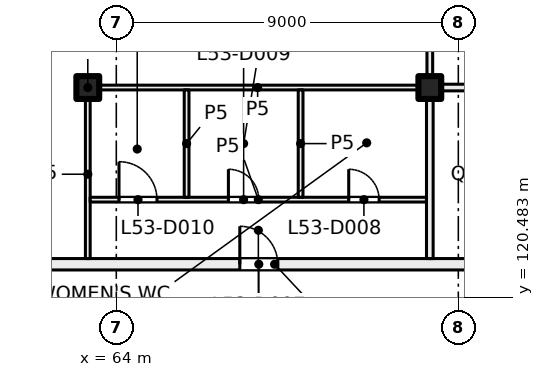
"""IFC4 building model, lengths in metres.
Left out: names, types, materials, properties, quantities, classifications, styles, units other than length and angle.
Written with IfcOpenShell. Run it as: python <this file> out.ifc"""

import sys

from ifc_helpers import new_model, si_unit, direction, frame, frame_2d, origin, origin_2d, place, context, subcontext, project, spatial, rectangle, extrude, element, fill, save


model = new_model("IFC4")
c1 = context("Model", 3, precision=1e-05, world=origin(), true_north=direction((0.0, 1.0)))
c2 = subcontext(c1, "Body", "Model", "MODEL_VIEW")
j1 = project(units=[si_unit("LENGTHUNIT", "METRE"), si_unit("PLANEANGLEUNIT", "RADIAN")], contexts=[c1])
p1 = place(None, origin())
s1 = spatial("IfcSite", under=j1, at=p1, CompositionType="ELEMENT")
p2 = place(p1, origin())
s2 = spatial("IfcBuilding", under=s1, at=p2, CompositionType="ELEMENT")
p3 = place(p2, frame((0.0, 0.0, 224.0)))
s3 = spatial("IfcBuildingStorey", under=s2, at=p3, CompositionType="ELEMENT", Elevation=224.0)
for number, where, z_axis, x_axis in (
    (1, (63.25, 126.0, 0.0), (0.0, 0.0, 1.0), (1.0, 0.0, 0.0)),
    (2, (72.25, 126.0, 0.0), (0.0, 0.0, 1.0), (1.0, 0.0, 0.0)),
):
    element("IfcColumn", number, at=place(p3, frame(where, z_axis=z_axis, x_axis=x_axis)), inside=s3, PredefinedType="COLUMN", context=c2, shape_type="SweptSolid", body=[
        extrude(rectangle(XDim=0.6, YDim=0.6, at=origin_2d()), origin(), (0.0, 0.0, 1.0), 4.0),
    ])
p4 = place(p3, frame((50.506, 121.35, 0.0), z_axis=(0.0, 0.0, 1.0), x_axis=(1.0, 0.0, 0.0)))
e3 = element("IfcWall", 3, at=p4, inside=s3, PredefinedType="PARTITIONING", context=c2, shape_type="SweptSolid", body=[
    extrude(rectangle(XDim=35.319, YDim=0.3, at=frame_2d((17.659, 0.0))), origin(), (0.0, 0.0, 1.0), 3.625),
])
p5 = place(p4, frame((27.244, 0.0, 0.0)))
e4 = element("IfcOpeningElement", 4, at=p5, cuts=e3, PredefinedType="OPENING", context=c2, shape_type="SweptSolid", body=[
    extrude(rectangle(XDim=1.0, YDim=2.1, at=frame_2d((0.5, 1.05))), frame((0.0, 0.16, 0.0), z_axis=(0.0, -1.0, 0.0), x_axis=(1.0, 0.0, 0.0)), (0.0, 0.0, 1.0), 0.32),
])
p6 = place(p4, frame((23.394, 0.0, 0.0)))
e5 = element("IfcOpeningElement", 5, at=p6, cuts=e3, PredefinedType="OPENING", context=c2, shape_type="SweptSolid", body=[
    extrude(rectangle(XDim=1.2, YDim=2.1, at=frame_2d((0.6, 1.05))), frame((0.0, 0.16, 0.0), z_axis=(0.0, -1.0, 0.0), x_axis=(1.0, 0.0, 0.0)), (0.0, 0.0, 1.0), 0.32),
])
p7 = place(p4, frame((32.094, 0.0, 0.0)))
e6 = element("IfcOpeningElement", 6, at=p7, cuts=e3, PredefinedType="OPENING", context=c2, shape_type="SweptSolid", body=[
    extrude(rectangle(XDim=1.8, YDim=2.1, at=frame_2d((0.9, 1.05))), frame((0.0, 0.16, 0.0), z_axis=(0.0, -1.0, 0.0), x_axis=(1.0, 0.0, 0.0)), (0.0, 0.0, 1.0), 0.32),
])
p8 = place(p4, frame((16.744, 0.0, 0.0)))
e7 = element("IfcOpeningElement", 7, at=p8, cuts=e3, PredefinedType="OPENING", context=c2, shape_type="SweptSolid", body=[
    extrude(rectangle(XDim=1.0, YDim=2.1, at=frame_2d((0.5, 1.05))), frame((0.0, 0.16, 0.0), z_axis=(0.0, -1.0, 0.0), x_axis=(1.0, 0.0, 0.0)), (0.0, 0.0, 1.0), 0.32),
])
p9 = place(p4, frame((7.344, 0.0, 0.0)))
e8 = element("IfcOpeningElement", 8, at=p9, cuts=e3, PredefinedType="OPENING", context=c2, shape_type="SweptSolid", body=[
    extrude(rectangle(XDim=1.8, YDim=2.1, at=frame_2d((0.9, 1.05))), frame((0.0, 0.16, 0.0), z_axis=(0.0, -1.0, 0.0), x_axis=(1.0, 0.0, 0.0)), (0.0, 0.0, 1.0), 0.32),
])
p10 = place(p4, frame((1.047, 0.0, 0.0)))
e9 = element("IfcOpeningElement", 9, at=p10, cuts=e3, PredefinedType="OPENING", context=c2, shape_type="SweptSolid", body=[
    extrude(rectangle(XDim=1.8, YDim=2.1, at=frame_2d((0.9, 1.05))), frame((0.0, 0.16, 0.0), z_axis=(0.0, -1.0, 0.0), x_axis=(1.0, 0.0, 0.0)), (0.0, 0.0, 1.0), 0.32),
])
p11 = place(p3, frame((63.25, 121.5, 0.0), z_axis=(0.0, 0.0, 1.0), x_axis=(0.0, 1.0, 0.0)))
e10 = element("IfcWall", 10, at=p11, inside=s3, PredefinedType="PARTITIONING", context=c2, shape_type="SweptSolid", body=[
    extrude(rectangle(XDim=4.438, YDim=0.125, at=frame_2d((2.219, 0.0))), origin(), (0.0, 0.0, 1.0), 3.625),
])
p12 = place(p3, frame((63.312, 123.05, 0.0), z_axis=(0.0, 0.0, 1.0), x_axis=(1.0, 0.0, 0.0)))
e11 = element("IfcWall", 11, at=p12, inside=s3, PredefinedType="PARTITIONING", context=c2, shape_type="SweptSolid", body=[
    extrude(rectangle(XDim=8.85, YDim=0.125, at=frame_2d((4.425, 0.0))), origin(), (0.0, 0.0, 1.0), 3.625),
])
p13 = place(p12, frame((6.804, 0.0, 0.0)))
e12 = element("IfcOpeningElement", 12, at=p13, cuts=e11, PredefinedType="OPENING", context=c2, shape_type="SweptSolid", body=[
    extrude(rectangle(XDim=0.8, YDim=2.1, at=frame_2d((0.4, 1.05))), frame((0.0, 0.073, 0.0), z_axis=(0.0, -1.0, 0.0), x_axis=(1.0, 0.0, 0.0)), (0.0, 0.0, 1.0), 0.145),
])
p14 = place(p12, frame((3.638, 0.0, 0.0)))
e13 = element("IfcOpeningElement", 13, at=p14, cuts=e11, PredefinedType="OPENING", context=c2, shape_type="SweptSolid", body=[
    extrude(rectangle(XDim=0.8, YDim=2.1, at=frame_2d((0.4, 1.05))), frame((0.0, 0.073, 0.0), z_axis=(0.0, -1.0, 0.0), x_axis=(1.0, 0.0, 0.0)), (0.0, 0.0, 1.0), 0.145),
])
p15 = place(p12, frame((0.759, 0.0, 0.0)))
e14 = element("IfcOpeningElement", 14, at=p15, cuts=e11, PredefinedType="OPENING", context=c2, shape_type="SweptSolid", body=[
    extrude(rectangle(XDim=1.0, YDim=2.1, at=frame_2d((0.5, 1.05))), frame((0.0, 0.073, 0.0), z_axis=(0.0, -1.0, 0.0), x_axis=(1.0, 0.0, 0.0)), (0.0, 0.0, 1.0), 0.145),
])
p16 = place(p3, frame((63.188, 126.0, 0.0), z_axis=(0.0, 0.0, 1.0), x_axis=(1.0, 0.0, 0.0)))
e15 = element("IfcWall", 15, at=p16, inside=s3, PredefinedType="PARTITIONING", context=c2, shape_type="SweptSolid", body=[
    extrude(rectangle(XDim=9.062, YDim=0.125, at=frame_2d((4.531, 0.0))), origin(), (0.0, 0.0, 1.0), 3.625),
])
for number, where, z_axis, x_axis in (
    (16, (65.85, 125.938, 0.0), (0.0, 0.0, 1.0), (0.0, -1.0, 0.0)),
    (17, (68.85, 125.938, 0.0), (0.0, 0.0, 1.0), (0.0, -1.0, 0.0)),
):
    element("IfcWall", number, at=place(p3, frame(where, z_axis=z_axis, x_axis=x_axis)), inside=s3, PredefinedType="PARTITIONING", context=c2, shape_type="SweptSolid", body=[
        extrude(rectangle(XDim=2.826, YDim=0.125, at=frame_2d((1.413, 0.0))), origin(), (0.0, 0.0, 1.0), 3.625),
    ])
p17 = place(p3, frame((72.25, 121.5, 0.0), z_axis=(0.0, 0.0, 1.0), x_axis=(0.0, 1.0, 0.0)))
e18 = element("IfcWall", 18, at=p17, inside=s3, PredefinedType="PARTITIONING", context=c2, shape_type="SweptSolid", body=[
    extrude(rectangle(XDim=4.5, YDim=0.175, at=frame_2d((2.25, 0.0))), origin(), (0.0, 0.0, 1.0), 3.625),
])
p18 = place(p3, frame((72.25, 126.0, 0.0), z_axis=(0.0, 0.0, 1.0), x_axis=(0.0, 1.0, 0.0)))
e19 = element("IfcWall", 19, at=p18, inside=s3, PredefinedType="PARTITIONING", context=c2, shape_type="SweptSolid", body=[
    extrude(rectangle(XDim=3.9, YDim=0.15, at=frame_2d((1.95, 0.0))), origin(), (0.0, 0.0, 1.0), 3.625),
])
p19 = place(p3, frame((72.25, 126.0, 0.0), z_axis=(0.0, 0.0, 1.0), x_axis=(1.0, 0.0, 0.0)))
e20 = element("IfcWall", 20, at=p19, inside=s3, PredefinedType="PARTITIONING", context=c2, shape_type="SweptSolid", body=[
    extrude(rectangle(XDim=4.5, YDim=0.175, at=frame_2d((2.25, 0.0))), origin(), (0.0, 0.0, 1.0), 3.625),
])
p20 = place(p8, origin())
e21 = element("IfcDoor", 21, at=p20, inside=s3, OperationType="SINGLE_SWING_LEFT", PredefinedType="DOOR", context=c2, shape_type="SweptSolid", body=[
    extrude(rectangle(XDim=1.0, YDim=2.1, at=frame_2d((0.5, 1.05))), frame((0.0, 0.025, 0.0), z_axis=(0.0, -1.0, 0.0), x_axis=(1.0, 0.0, 0.0)), (0.0, 0.0, 1.0), 0.05),
])
fill(e7, e21)
p21 = place(p13, origin())
e22 = element("IfcDoor", 22, at=p21, inside=s3, OperationType="SINGLE_SWING_RIGHT", PredefinedType="DOOR", context=c2, shape_type="SweptSolid", body=[
    extrude(rectangle(XDim=0.8, YDim=2.1, at=frame_2d((0.4, 1.05))), frame((0.0, 0.025, 0.0), z_axis=(0.0, -1.0, 0.0), x_axis=(1.0, 0.0, 0.0)), (0.0, 0.0, 1.0), 0.05),
])
fill(e12, e22)
p22 = place(p14, origin())
e23 = element("IfcDoor", 23, at=p22, inside=s3, OperationType="SINGLE_SWING_LEFT", PredefinedType="DOOR", context=c2, shape_type="SweptSolid", body=[
    extrude(rectangle(XDim=0.8, YDim=2.1, at=frame_2d((0.4, 1.05))), frame((0.0, 0.025, 0.0), z_axis=(0.0, -1.0, 0.0), x_axis=(1.0, 0.0, 0.0)), (0.0, 0.0, 1.0), 0.05),
])
fill(e13, e23)
p23 = place(p15, origin())
e24 = element("IfcDoor", 24, at=p23, inside=s3, OperationType="SINGLE_SWING_LEFT", PredefinedType="DOOR", context=c2, shape_type="SweptSolid", body=[
    extrude(rectangle(XDim=1.0, YDim=2.1, at=frame_2d((0.5, 1.05))), frame((0.0, 0.025, 0.0), z_axis=(0.0, -1.0, 0.0), x_axis=(1.0, 0.0, 0.0)), (0.0, 0.0, 1.0), 0.05),
])
fill(e14, e24)
save(model, sys.argv[1])
